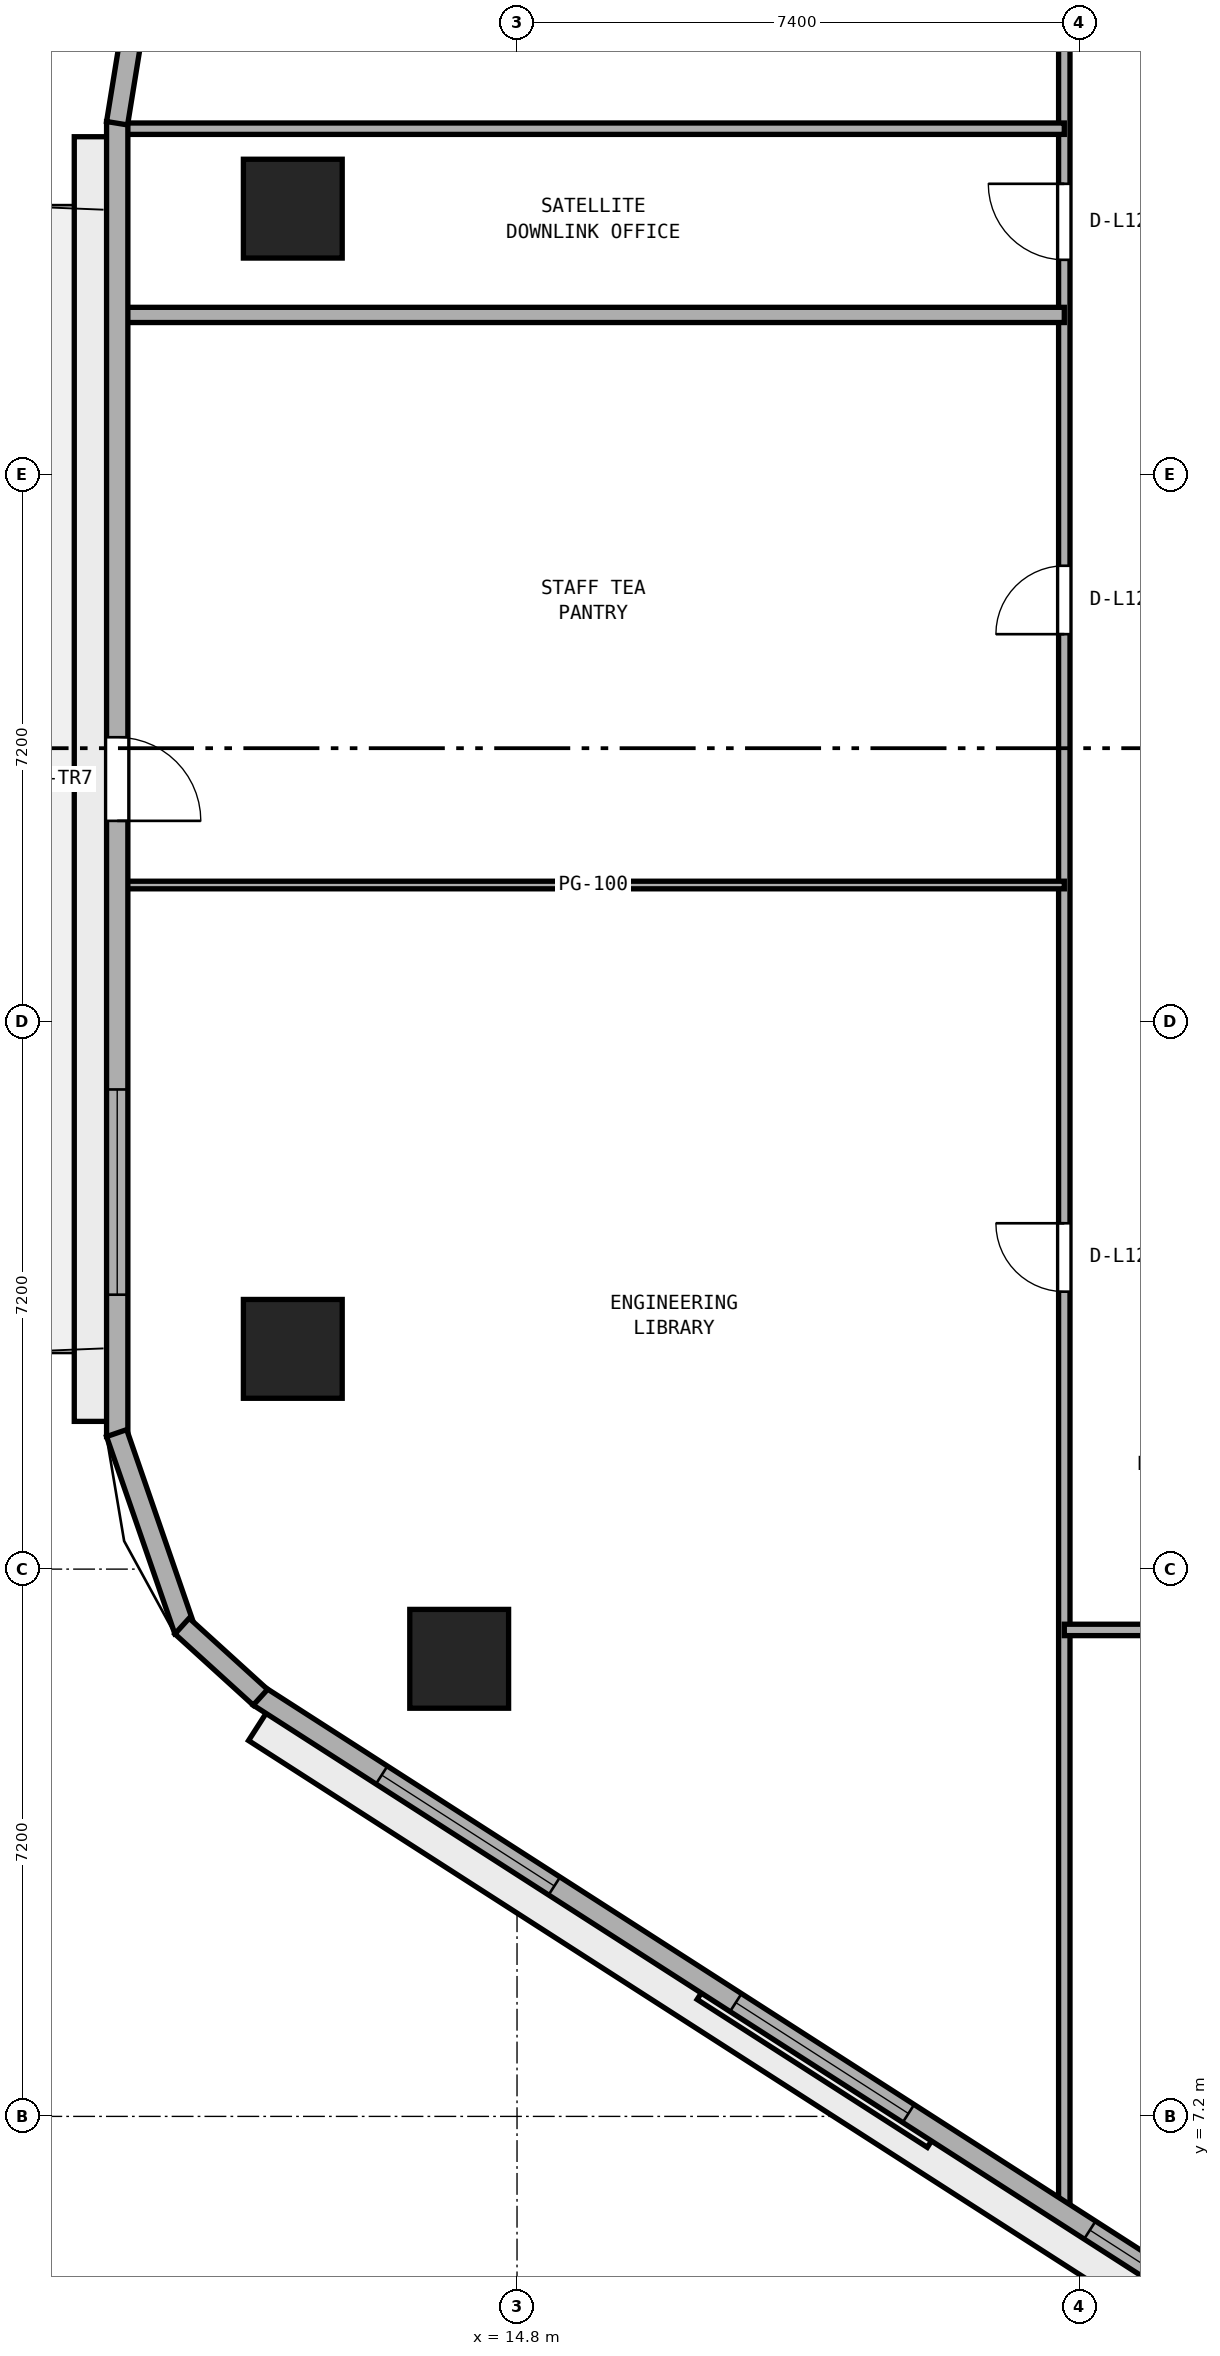
"""IFC4 building model, lengths in metres.
Left out: names, types, materials, properties, quantities, classifications, styles, units other than length and angle.
Written with IfcOpenShell. Run it as: python <this file> out.ifc"""

import sys

from ifc_helpers import new_model, si_unit, direction, frame, frame_2d, origin, origin_2d, place, context, subcontext, project, spatial, rectangle, extrude, element, fill, save


model = new_model("IFC4")
c1 = context("Model", 3, precision=1e-05, world=origin(), true_north=direction((0.0, 1.0)))
c2 = subcontext(c1, "Body", "Model", "MODEL_VIEW")
j1 = project(units=[si_unit("LENGTHUNIT", "METRE"), si_unit("PLANEANGLEUNIT", "RADIAN")], contexts=[c1])
p1 = place(None, origin())
s1 = spatial("IfcSite", under=j1, at=p1, CompositionType="ELEMENT")
p2 = place(p1, origin())
s2 = spatial("IfcBuilding", under=s1, at=p2, CompositionType="ELEMENT")
p3 = place(p2, frame((0.0, 0.0, 51.6)))
s3 = spatial("IfcBuildingStorey", under=s2, at=p3, CompositionType="ELEMENT", Elevation=51.6)
for number, where, z_axis, x_axis in (
    (1, (11.85, 32.298, 0.0), (0.0, 0.0, 1.0), (1.0, 0.0, 0.0)),
    (2, (11.85, 17.298, 0.0), (0.0, 0.0, 1.0), (1.0, 0.0, 0.0)),
    (3, (14.039, 13.22, 0.0), (0.0, 0.0, 1.0), (1.0, 0.0, 0.0)),
):
    element("IfcColumn", number, at=place(p3, frame(where, z_axis=z_axis, x_axis=x_axis)), inside=s3, PredefinedType="COLUMN", context=c2, shape_type="SweptSolid", body=[
        extrude(rectangle(XDim=1.3, YDim=1.3, at=origin_2d()), origin(), (0.0, 0.0, 1.0), 3.8),
    ])
p4 = place(p3, frame((22.0, 5.894, 0.0), z_axis=(0.0, 0.0, 1.0), x_axis=(0.0, 1.0, 0.0)))
e4 = element("IfcWall", 4, at=p4, inside=s3, PredefinedType="PARTITIONING", context=c2, shape_type="SweptSolid", body=[
    extrude(rectangle(XDim=30.906, YDim=0.15, at=frame_2d((15.453, 0.0))), origin(), (0.0, 0.0, 1.0), 3.525),
])
p5 = place(p4, frame((12.156, 0.0, 0.0)))
e5 = element("IfcOpeningElement", 5, at=p5, cuts=e4, PredefinedType="OPENING", context=c2, shape_type="SweptSolid", body=[
    extrude(rectangle(XDim=0.9, YDim=2.1, at=frame_2d((0.45, 1.05))), frame((0.0, 0.085, 0.0), z_axis=(0.0, -1.0, 0.0), x_axis=(1.0, 0.0, 0.0)), (0.0, 0.0, 1.0), 0.17),
])
p6 = place(p4, frame((20.806, 0.0, 0.0)))
e6 = element("IfcOpeningElement", 6, at=p6, cuts=e4, PredefinedType="OPENING", context=c2, shape_type="SweptSolid", body=[
    extrude(rectangle(XDim=0.9, YDim=2.1, at=frame_2d((0.45, 1.05))), frame((0.0, 0.085, 0.0), z_axis=(0.0, -1.0, 0.0), x_axis=(1.0, 0.0, 0.0)), (0.0, 0.0, 1.0), 0.17),
])
p7 = place(p4, frame((25.731, 0.0, 0.0)))
e7 = element("IfcOpeningElement", 7, at=p7, cuts=e4, PredefinedType="OPENING", context=c2, shape_type="SweptSolid", body=[
    extrude(rectangle(XDim=1.0, YDim=2.12, at=frame_2d((0.5, 1.06))), frame((0.0, 0.085, 0.0), z_axis=(0.0, -1.0, 0.0), x_axis=(1.0, 0.0, 0.0)), (0.0, 0.0, 1.0), 0.17),
])
p8 = place(p3, frame((22.0, 13.6, 0.0), z_axis=(0.0, 0.0, 1.0), x_axis=(1.0, 0.0, 0.0)))
e8 = element("IfcWall", 8, at=p8, inside=s3, PredefinedType="PARTITIONING", context=c2, shape_type="SweptSolid", body=[
    extrude(rectangle(XDim=30.0, YDim=0.15, at=frame_2d((15.0, 0.0))), origin(), (0.0, 0.0, 1.0), 3.525),
])
p9 = place(p8, frame((6.22, 0.0, 0.0)))
e9 = element("IfcOpeningElement", 9, at=p9, cuts=e8, PredefinedType="OPENING", context=c2, shape_type="SweptSolid", body=[
    extrude(rectangle(XDim=0.9, YDim=2.1, at=frame_2d((0.45, 1.05))), frame((0.0, 0.085, 0.0), z_axis=(0.0, -1.0, 0.0), x_axis=(1.0, 0.0, 0.0)), (0.0, 0.0, 1.0), 0.17),
])
p10 = place(p8, frame((20.98, 0.0, 0.0)))
e10 = element("IfcOpeningElement", 10, at=p10, cuts=e8, PredefinedType="OPENING", context=c2, shape_type="SweptSolid", body=[
    extrude(rectangle(XDim=0.9, YDim=2.1, at=frame_2d((0.45, 1.05))), frame((0.0, 0.085, 0.0), z_axis=(0.0, -1.0, 0.0), x_axis=(1.0, 0.0, 0.0)), (0.0, 0.0, 1.0), 0.17),
])
p11 = place(p3, frame((9.605, 23.4, 0.0), z_axis=(0.0, 0.0, 1.0), x_axis=(1.0, 0.0, 0.0)))
e11 = element("IfcWall", 11, at=p11, inside=s3, PredefinedType="PARTITIONING", context=c2, shape_type="SweptSolid", body=[
    extrude(rectangle(XDim=12.395, YDim=0.1, at=frame_2d((6.198, 0.0))), origin(), (0.0, 0.0, 1.0), 3.525),
])
p12 = place(p3, frame((9.605, 30.9, 0.0), z_axis=(0.0, 0.0, 1.0), x_axis=(1.0, 0.0, 0.0)))
e12 = element("IfcWall", 12, at=p12, inside=s3, PredefinedType="PARTITIONING", context=c2, shape_type="SweptSolid", body=[
    extrude(rectangle(XDim=12.395, YDim=0.2, at=frame_2d((6.198, 0.0))), origin(), (0.0, 0.0, 1.0), 3.525),
])
p13 = place(p3, frame((9.605, 33.35, 0.0), z_axis=(0.0, 0.0, 1.0), x_axis=(1.0, 0.0, 0.0)))
e13 = element("IfcWall", 13, at=p13, inside=s3, PredefinedType="PARTITIONING", context=c2, shape_type="SweptSolid", body=[
    extrude(rectangle(XDim=12.395, YDim=0.15, at=frame_2d((6.198, 0.0))), origin(), (0.0, 0.0, 1.0), 3.525),
])
p14 = place(p3, frame((9.54, 33.444, 0.0), z_axis=(0.0, 0.0, 1.0), x_axis=(0.0, -1.0, 0.0)))
e14 = element("IfcWall", 14, at=p14, inside=s3, PredefinedType="STANDARD", context=c2, shape_type="SweptSolid", body=[
    extrude(rectangle(XDim=17.301, YDim=0.28, at=frame_2d((8.65, 0.0))), origin(), (0.0, 0.0, 1.0), 3.525),
])
p15 = place(p14, frame((8.1, 0.0, 0.0)))
e15 = element("IfcOpeningElement", 15, at=p15, cuts=e14, PredefinedType="OPENING", context=c2, shape_type="SweptSolid", body=[
    extrude(rectangle(XDim=1.1, YDim=2.2, at=frame_2d((0.55, 1.1))), frame((0.0, 0.15, 0.0), z_axis=(0.0, -1.0, 0.0), x_axis=(1.0, 0.0, 0.0)), (0.0, 0.0, 1.0), 0.3),
])
p16 = place(p14, frame((12.734, 0.0, 0.9)))
e16 = element("IfcOpeningElement", 16, at=p16, cuts=e14, PredefinedType="OPENING", context=c2, shape_type="SweptSolid", body=[
    extrude(rectangle(XDim=2.7, YDim=1.75, at=frame_2d((1.35, 0.875))), frame((0.0, 0.15, 0.0), z_axis=(0.0, -1.0, 0.0), x_axis=(1.0, 0.0, 0.0)), (0.0, 0.0, 1.0), 0.3),
])
p17 = place(p3, frame((11.405, 12.728, 0.0), z_axis=(0.0, 0.0, 1.0), x_axis=(0.841304564637, -0.540561402175, 0.0)))
e17 = element("IfcWall", 17, at=p17, inside=s3, PredefinedType="STANDARD", context=c2, shape_type="SweptSolid", body=[
    extrude(rectangle(XDim=17.612, YDim=0.28, at=frame_2d((8.806, 0.0))), origin(), (0.0, 0.0, 1.0), 3.525),
])
p18 = place(p17, frame((1.919, 0.0, 0.9)))
e18 = element("IfcOpeningElement", 18, at=p18, cuts=e17, PredefinedType="OPENING", context=c2, shape_type="SweptSolid", body=[
    extrude(rectangle(XDim=2.7, YDim=1.75, at=frame_2d((1.35, 0.875))), frame((0.0, 0.15, 0.0), z_axis=(0.0, -1.0, 0.0), x_axis=(1.0, 0.0, 0.0)), (0.0, 0.0, 1.0), 0.3),
])
p19 = place(p17, frame((7.456, 0.0, 0.9)))
e19 = element("IfcOpeningElement", 19, at=p19, cuts=e17, PredefinedType="OPENING", context=c2, shape_type="SweptSolid", body=[
    extrude(rectangle(XDim=2.7, YDim=1.75, at=frame_2d((1.35, 0.875))), frame((0.0, 0.15, 0.0), z_axis=(0.0, -1.0, 0.0), x_axis=(1.0, 0.0, 0.0)), (0.0, 0.0, 1.0), 0.3),
])
p20 = place(p17, frame((12.993, 0.0, 0.9)))
e20 = element("IfcOpeningElement", 20, at=p20, cuts=e17, PredefinedType="OPENING", context=c2, shape_type="SweptSolid", body=[
    extrude(rectangle(XDim=2.7, YDim=1.75, at=frame_2d((1.35, 0.875))), frame((0.0, 0.15, 0.0), z_axis=(0.0, -1.0, 0.0), x_axis=(1.0, 0.0, 0.0)), (0.0, 0.0, 1.0), 0.3),
])
p21 = place(p3, frame((9.753, 34.749, 0.0), z_axis=(0.0, 0.0, 1.0), x_axis=(-0.160037671962, -0.987110907423, 0.0)))
e21 = element("IfcWall", 21, at=p21, inside=s3, PredefinedType="STANDARD", context=c2, shape_type="SweptSolid", body=[
    extrude(rectangle(XDim=1.344, YDim=0.28, at=frame_2d((0.672, 0.0))), origin(), (0.0, 0.0, 1.0), 3.525),
])
p22 = place(p3, frame((9.532, 16.189, 0.0), z_axis=(0.0, 0.0, 1.0), x_axis=(0.32708309668, -0.944995580871, 0.0)))
e22 = element("IfcWall", 22, at=p22, inside=s3, PredefinedType="STANDARD", context=c2, shape_type="SweptSolid", body=[
    extrude(rectangle(XDim=2.748, YDim=0.28, at=frame_2d((1.374, 0.0))), origin(), (0.0, 0.0, 1.0), 3.525),
])
p23 = place(p3, frame((10.393, 13.651, 0.0), z_axis=(0.0, 0.0, 1.0), x_axis=(0.74003521851, -0.672568119498, 0.0)))
e23 = element("IfcWall", 23, at=p23, inside=s3, PredefinedType="STANDARD", context=c2, shape_type="SweptSolid", body=[
    extrude(rectangle(XDim=1.393, YDim=0.28, at=frame_2d((0.697, 0.0))), origin(), (0.0, 0.0, 1.0), 3.525),
])
p24 = place(p5, origin())
e24 = element("IfcDoor", 24, at=p24, inside=s3, OperationType="SINGLE_SWING_RIGHT", PredefinedType="DOOR", context=c2, shape_type="SweptSolid", body=[
    extrude(rectangle(XDim=0.9, YDim=2.1, at=frame_2d((0.45, 1.05))), frame((0.0, 0.025, 0.0), z_axis=(0.0, -1.0, 0.0), x_axis=(1.0, 0.0, 0.0)), (0.0, 0.0, 1.0), 0.05),
])
fill(e5, e24)
p25 = place(p6, origin())
e25 = element("IfcDoor", 25, at=p25, inside=s3, OperationType="SINGLE_SWING_LEFT", PredefinedType="DOOR", context=c2, shape_type="SweptSolid", body=[
    extrude(rectangle(XDim=0.9, YDim=2.1, at=frame_2d((0.45, 1.05))), frame((0.0, 0.025, 0.0), z_axis=(0.0, -1.0, 0.0), x_axis=(1.0, 0.0, 0.0)), (0.0, 0.0, 1.0), 0.05),
])
fill(e6, e25)
p26 = place(p7, origin())
e26 = element("IfcDoor", 26, at=p26, inside=s3, OperationType="SINGLE_SWING_RIGHT", PredefinedType="DOOR", context=c2, shape_type="SweptSolid", body=[
    extrude(rectangle(XDim=1.0, YDim=2.12, at=frame_2d((0.5, 1.06))), frame((0.0, 0.025, 0.0), z_axis=(0.0, -1.0, 0.0), x_axis=(1.0, 0.0, 0.0)), (0.0, 0.0, 1.0), 0.05),
])
fill(e7, e26)
p27 = place(p15, origin())
e27 = element("IfcDoor", 27, at=p27, inside=s3, OperationType="SINGLE_SWING_RIGHT", PredefinedType="DOOR", context=c2, shape_type="SweptSolid", body=[
    extrude(rectangle(XDim=1.1, YDim=2.2, at=frame_2d((0.55, 1.1))), frame((0.0, 0.025, 0.0), z_axis=(0.0, -1.0, 0.0), x_axis=(1.0, 0.0, 0.0)), (0.0, 0.0, 1.0), 0.05),
])
fill(e15, e27)
p28 = place(p16, origin())
e28 = element("IfcWindow", 28, at=p28, inside=s3, PartitioningType="SINGLE_PANEL", PredefinedType="WINDOW", context=c2, shape_type="SweptSolid", body=[
    extrude(rectangle(XDim=2.7, YDim=1.75, at=frame_2d((1.35, 0.875))), frame((0.0, 0.03, 0.0), z_axis=(0.0, -1.0, 0.0), x_axis=(1.0, 0.0, 0.0)), (0.0, 0.0, 1.0), 0.06),
])
fill(e16, e28)
p29 = place(p18, origin())
e29 = element("IfcWindow", 29, at=p29, inside=s3, PartitioningType="SINGLE_PANEL", PredefinedType="WINDOW", context=c2, shape_type="SweptSolid", body=[
    extrude(rectangle(XDim=2.7, YDim=1.75, at=frame_2d((1.35, 0.875))), frame((0.0, 0.03, 0.0), z_axis=(0.0, -1.0, 0.0), x_axis=(1.0, 0.0, 0.0)), (0.0, 0.0, 1.0), 0.06),
])
fill(e18, e29)
p30 = place(p19, origin())
e30 = element("IfcWindow", 30, at=p30, inside=s3, PartitioningType="SINGLE_PANEL", PredefinedType="WINDOW", context=c2, shape_type="SweptSolid", body=[
    extrude(rectangle(XDim=2.7, YDim=1.75, at=frame_2d((1.35, 0.875))), frame((0.0, 0.03, 0.0), z_axis=(0.0, -1.0, 0.0), x_axis=(1.0, 0.0, 0.0)), (0.0, 0.0, 1.0), 0.06),
])
fill(e19, e30)
p31 = place(p20, origin())
e31 = element("IfcWindow", 31, at=p31, inside=s3, PartitioningType="SINGLE_PANEL", PredefinedType="WINDOW", context=c2, shape_type="SweptSolid", body=[
    extrude(rectangle(XDim=2.7, YDim=1.75, at=frame_2d((1.35, 0.875))), frame((0.0, 0.03, 0.0), z_axis=(0.0, -1.0, 0.0), x_axis=(1.0, 0.0, 0.0)), (0.0, 0.0, 1.0), 0.06),
])
fill(e20, e31)
save(model, sys.argv[1])
